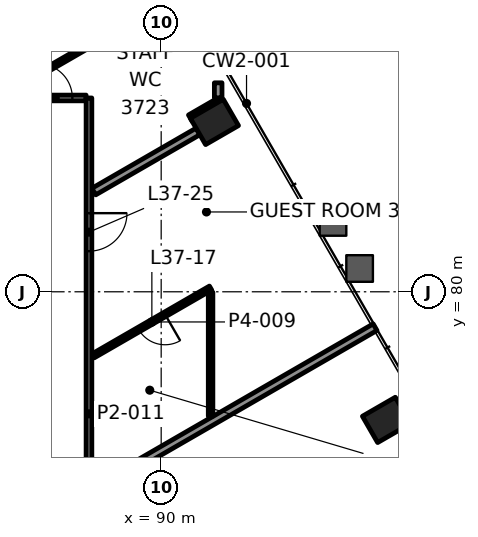
"""IFC4 building model, lengths in metres.
Left out: names, types, materials, properties, quantities, classifications, styles, units other than length and angle.
Written with IfcOpenShell. Run it as: python <this file> out.ifc"""

import sys

from ifc_helpers import new_model, si_unit, direction, frame, frame_2d, origin, origin_2d, place, context, subcontext, project, spatial, rectangle, hollow_rectangle, extrude, element, fill, save


model = new_model("IFC4")
c1 = context("Model", 3, precision=1e-05, world=origin(), true_north=direction((0.0, 1.0)))
c2 = subcontext(c1, "Body", "Model", "MODEL_VIEW")
j1 = project(units=[si_unit("LENGTHUNIT", "METRE"), si_unit("PLANEANGLEUNIT", "RADIAN")], contexts=[c1])
p1 = place(None, origin())
s1 = spatial("IfcSite", under=j1, at=p1, CompositionType="ELEMENT")
p2 = place(p1, origin())
s2 = spatial("IfcBuilding", under=s1, at=p2, CompositionType="ELEMENT")
p3 = place(p2, frame((0.0, 0.0, 163.6)))
s3 = spatial("IfcBuildingStorey", under=s2, at=p3, CompositionType="ELEMENT", Elevation=163.6)
for number, where, z_axis, x_axis in (
    (1, (95.928, 76.628, -0.0), (0.0, 0.0, 1.0), (-0.5, 0.866, 0.0)),
    (2, (91.402, 84.469, -0.0), (0.0, 0.0, 1.0), (-0.5, 0.866, 0.0)),
):
    element("IfcColumn", number, at=place(p3, frame(where, z_axis=z_axis, x_axis=x_axis)), inside=s3, PredefinedType="COLUMN", context=c2, shape_type="SweptSolid", body=[
        extrude(hollow_rectangle(XDim=0.8, YDim=1.0, WallThickness=0.05, at=origin_2d()), origin(), (0.0, 0.0, 1.0), 3.9),
    ])
p4 = place(p3, frame((78.913, 85.1, 0.0), z_axis=(0.0, 0.0, 1.0), x_axis=(1.0, 0.0, 0.0)))
e3 = element("IfcWall", 3, at=p4, inside=s3, PredefinedType="PARTITIONING", context=c2, shape_type="SweptSolid", body=[
    extrude(rectangle(XDim=9.112, YDim=0.15, at=frame_2d((4.556, 0.0))), origin(), (0.0, 0.0, 1.0), 3.1),
])
p5 = place(p4, frame((3.048, 0.0, 0.0)))
e4 = element("IfcOpeningElement", 4, at=p5, cuts=e3, PredefinedType="OPENING", context=c2, shape_type="SweptSolid", body=[
    extrude(rectangle(XDim=0.9, YDim=2.1, at=frame_2d((0.45, 1.05))), frame((0.0, 0.085, 0.0), z_axis=(0.0, -1.0, 0.0), x_axis=(1.0, 0.0, 0.0)), (0.0, 0.0, 1.0), 0.17),
])
p6 = place(p4, frame((7.85, 0.0, 0.0)))
e5 = element("IfcOpeningElement", 5, at=p6, cuts=e3, PredefinedType="OPENING", context=c2, shape_type="SweptSolid", body=[
    extrude(rectangle(XDim=0.9, YDim=2.1, at=frame_2d((0.45, 1.05))), frame((0.0, 0.085, 0.0), z_axis=(0.0, -1.0, 0.0), x_axis=(1.0, 0.0, 0.0)), (0.0, 0.0, 1.0), 0.17),
])
p7 = place(p3, frame((88.227, 74.795, 0.0), z_axis=(0.0, 0.0, 1.0), x_axis=(0.866017652766, 0.500013424917, 0.0)))
e6 = element("IfcWall", 6, at=p7, inside=s3, PredefinedType="PARTITIONING", context=c2, shape_type="SweptSolid", body=[
    extrude(rectangle(XDim=8.546, YDim=0.2, at=frame_2d((4.273, 0.0))), origin(), (0.0, 0.0, 1.0), 2.865),
])
p8 = place(p3, frame((91.3, 80.098, 0.0), z_axis=(0.0, 0.0, 1.0), x_axis=(-0.866028357664, -0.499994883695, 0.0)))
e7 = element("IfcWall", 7, at=p8, inside=s3, PredefinedType="PARTITIONING", context=c2, shape_type="SweptSolid", body=[
    extrude(rectangle(XDim=3.568, YDim=0.12, at=frame_2d((1.784, 0.0))), origin(), (0.0, 0.0, 1.0), 3.1),
])
p9 = place(p8, frame((1.384, 0.0, 0.0)))
e8 = element("IfcOpeningElement", 8, at=p9, cuts=e7, PredefinedType="OPENING", context=c2, shape_type="SweptSolid", body=[
    extrude(rectangle(XDim=0.8, YDim=2.1, at=frame_2d((0.4, 1.05))), frame((0.0, 0.07, 0.0), z_axis=(0.0, -1.0, 0.0), x_axis=(1.0, 0.0, 0.0)), (0.0, 0.0, 1.0), 0.14),
])
p10 = place(p3, frame((88.227, 82.637, 0.0), z_axis=(0.0, 0.0, 1.0), x_axis=(0.866046892487, 0.499962778628, 0.0)))
e9 = element("IfcWall", 9, at=p10, inside=s3, PredefinedType="PARTITIONING", context=c2, shape_type="SweptSolid", body=[
    extrude(rectangle(XDim=3.166, YDim=0.2, at=frame_2d((1.583, 0.0))), origin(), (0.0, 0.0, 1.0), 3.1),
])
p11 = place(p3, frame((90.769, 84.566, 0.0), z_axis=(0.0, 0.0, 1.0), x_axis=(0.865993035835, 0.500056058743, 0.0)))
e10 = element("IfcWall", 10, at=p11, inside=s3, PredefinedType="PARTITIONING", context=c2, shape_type="SweptSolid", body=[
    extrude(rectangle(XDim=0.845, YDim=0.2, at=frame_2d((0.422, 0.0))), origin(), (0.0, 0.0, 1.0), 2.865),
])
p12 = place(p3, frame((85.928, 85.23, 0.0), z_axis=(0.0, 0.0, 1.0), x_axis=(0.866037319036, 0.49997936161, 0.0)))
e11 = element("IfcWall", 11, at=p12, inside=s3, PredefinedType="PARTITIONING", context=c2, shape_type="SweptSolid", body=[
    extrude(rectangle(XDim=5.32, YDim=0.12, at=frame_2d((2.66, 0.0))), origin(), (0.0, 0.0, 1.0), 2.865),
])
p13 = place(p3, frame((91.5, 85.104, 0.0), z_axis=(0.0, 0.0, 1.0), x_axis=(0.0, 1.0, 0.0)))
e12 = element("IfcWall", 12, at=p13, inside=s3, PredefinedType="PARTITIONING", context=c2, shape_type="SweptSolid", body=[
    extrude(rectangle(XDim=0.395, YDim=0.2, at=frame_2d((0.198, 0.0))), origin(), (0.0, 0.0, 1.0), 3.1),
])
p14 = place(p3, frame((91.3, 76.725, 0.0), z_axis=(0.0, 0.0, 1.0), x_axis=(0.0, 1.0, 0.0)))
e13 = element("IfcWall", 13, at=p14, inside=s3, PredefinedType="PARTITIONING", context=c2, shape_type="SweptSolid", body=[
    extrude(rectangle(XDim=3.264, YDim=0.12, at=frame_2d((1.632, 0.0))), origin(), (0.0, 0.0, 1.0), 3.1),
])
p15 = place(p3, frame((88.1, 85.1, 0.0), z_axis=(0.0, 0.0, 1.0), x_axis=(0.0, -1.0, 0.0)))
e14 = element("IfcWall", 14, at=p15, inside=s3, PredefinedType="PARTITIONING", context=c2, shape_type="SweptSolid", body=[
    extrude(rectangle(XDim=16.624, YDim=0.15, at=frame_2d((8.312, 0.0))), origin(), (0.0, 0.0, 1.0), 3.1),
])
p16 = place(p15, frame((3.031, 0.0, 0.0)))
e15 = element("IfcOpeningElement", 15, at=p16, cuts=e14, PredefinedType="OPENING", context=c2, shape_type="SweptSolid", body=[
    extrude(rectangle(XDim=1.0, YDim=2.1, at=frame_2d((0.5, 1.05))), frame((0.0, 0.085, 0.0), z_axis=(0.0, -1.0, 0.0), x_axis=(1.0, 0.0, 0.0)), (0.0, 0.0, 1.0), 0.17),
])
p17 = place(p15, frame((10.872, 0.0, 0.0)))
e16 = element("IfcOpeningElement", 16, at=p17, cuts=e14, PredefinedType="OPENING", context=c2, shape_type="SweptSolid", body=[
    extrude(rectangle(XDim=1.0, YDim=2.1, at=frame_2d((0.5, 1.05))), frame((0.0, 0.085, 0.0), z_axis=(0.0, -1.0, 0.0), x_axis=(1.0, 0.0, 0.0)), (0.0, 0.0, 1.0), 0.17),
])
p18 = place(p6, origin())
e17 = element("IfcDoor", 17, at=p18, inside=s3, OperationType="SINGLE_SWING_RIGHT", PredefinedType="DOOR", context=c2, shape_type="SweptSolid", body=[
    extrude(rectangle(XDim=0.9, YDim=2.1, at=frame_2d((0.45, 1.05))), frame((0.0, 0.025, 0.0), z_axis=(0.0, -1.0, 0.0), x_axis=(1.0, 0.0, 0.0)), (0.0, 0.0, 1.0), 0.05),
])
fill(e5, e17)
p19 = place(p9, origin())
e18 = element("IfcDoor", 18, at=p19, inside=s3, OperationType="SINGLE_SWING_RIGHT", PredefinedType="DOOR", context=c2, shape_type="SweptSolid", body=[
    extrude(rectangle(XDim=0.8, YDim=2.1, at=frame_2d((0.4, 1.05))), frame((0.0, 0.025, 0.0), z_axis=(0.0, -1.0, 0.0), x_axis=(1.0, 0.0, 0.0)), (0.0, 0.0, 1.0), 0.05),
])
fill(e8, e18)
p20 = place(p16, origin())
e19 = element("IfcDoor", 19, at=p20, inside=s3, OperationType="SINGLE_SWING_LEFT", PredefinedType="DOOR", context=c2, shape_type="SweptSolid", body=[
    extrude(rectangle(XDim=1.0, YDim=2.1, at=frame_2d((0.5, 1.05))), frame((0.0, 0.025, 0.0), z_axis=(0.0, -1.0, 0.0), x_axis=(1.0, 0.0, 0.0)), (0.0, 0.0, 1.0), 0.05),
])
fill(e15, e19)
save(model, sys.argv[1])
